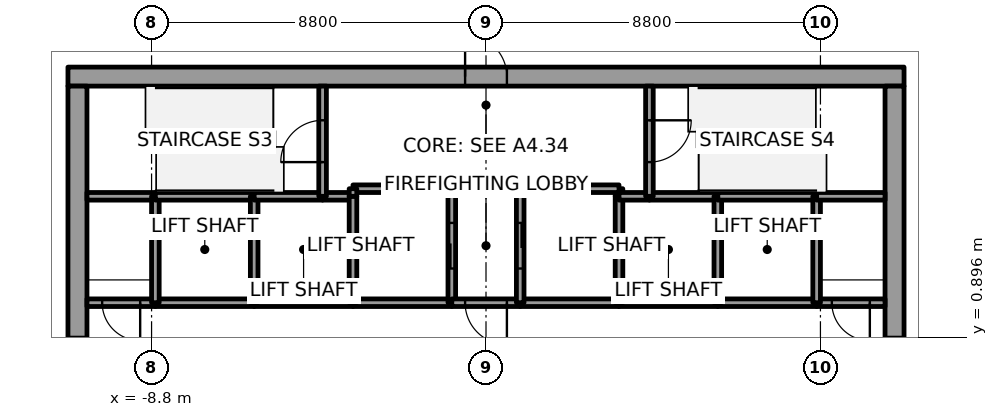
"""IFC4 building model, lengths in metres.
Left out: names, types, materials, properties, quantities, classifications, styles, units other than length and angle.
Written with IfcOpenShell. Run it as: python <this file> out.ifc"""

import sys

from ifc_helpers import new_model, si_unit, direction, frame, frame_2d, origin, place, context, subcontext, project, spatial, rectangle, extrude, element, fill, save


model = new_model("IFC4")
c1 = context("Model", 3, precision=1e-05, world=origin(), true_north=direction((0.0, 1.0)))
c2 = subcontext(c1, "Body", "Model", "MODEL_VIEW")
j1 = project(units=[si_unit("LENGTHUNIT", "METRE"), si_unit("PLANEANGLEUNIT", "RADIAN")], contexts=[c1])
p1 = place(None, origin())
s1 = spatial("IfcSite", under=j1, at=p1, CompositionType="ELEMENT")
p2 = place(p1, origin())
s2 = spatial("IfcBuilding", under=s1, at=p2, CompositionType="ELEMENT")
p3 = place(p2, frame((0.0, 0.0, 149.8)))
s3 = spatial("IfcBuildingStorey", under=s2, at=p3, CompositionType="ELEMENT", Elevation=149.8)
p4 = place(p3, frame((-11.0, 7.75, 0.0), z_axis=(0.0, 0.0, 1.0), x_axis=(1.0, 0.0, 0.0)))
e1 = element("IfcWall", 1, at=p4, inside=s3, PredefinedType="SHEAR", context=c2, shape_type="SweptSolid", body=[
    extrude(rectangle(XDim=22.0, YDim=0.5, at=frame_2d((11.0, 0.0))), origin(), (0.0, 0.0, 1.0), 4.0),
])
p5 = place(p4, frame((10.45, 0.0, 0.0)))
e2 = element("IfcOpeningElement", 2, at=p5, cuts=e1, PredefinedType="OPENING", context=c2, shape_type="SweptSolid", body=[
    extrude(rectangle(XDim=1.1, YDim=2.1, at=frame_2d((0.55, 1.05))), frame((0.0, 0.25, 0.0), z_axis=(0.0, -1.0, 0.0), x_axis=(1.0, 0.0, 0.0)), (0.0, 0.0, 1.0), 0.5),
])
p6 = place(p3, frame((-10.75, -7.5, 0.0), z_axis=(0.0, 0.0, 1.0), x_axis=(0.0, 1.0, 0.0)))
e3 = element("IfcWall", 3, at=p6, inside=s3, PredefinedType="SHEAR", context=c2, shape_type="SweptSolid", body=[
    extrude(rectangle(XDim=15.0, YDim=0.5, at=frame_2d((7.5, 0.0))), origin(), (0.0, 0.0, 1.0), 4.0),
])
p7 = place(p6, frame((6.6, 0.0, 0.0)))
e4 = element("IfcOpeningElement", 4, at=p7, cuts=e3, PredefinedType="OPENING", context=c2, shape_type="SweptSolid", body=[
    extrude(rectangle(XDim=1.8, YDim=2.1, at=frame_2d((0.9, 1.05))), frame((0.0, 0.25, 0.0), z_axis=(0.0, -1.0, 0.0), x_axis=(1.0, 0.0, 0.0)), (0.0, 0.0, 1.0), 0.5),
])
p8 = place(p3, frame((10.75, -7.5, 0.0), z_axis=(0.0, 0.0, 1.0), x_axis=(0.0, 1.0, 0.0)))
e5 = element("IfcWall", 5, at=p8, inside=s3, PredefinedType="SHEAR", context=c2, shape_type="SweptSolid", body=[
    extrude(rectangle(XDim=15.0, YDim=0.5, at=frame_2d((7.5, 0.0))), origin(), (0.0, 0.0, 1.0), 4.0),
])
p9 = place(p8, frame((6.6, 0.0, 0.0)))
e6 = element("IfcOpeningElement", 6, at=p9, cuts=e5, PredefinedType="OPENING", context=c2, shape_type="SweptSolid", body=[
    extrude(rectangle(XDim=1.8, YDim=2.1, at=frame_2d((0.9, 1.05))), frame((0.0, 0.25, 0.0), z_axis=(0.0, -1.0, 0.0), x_axis=(1.0, 0.0, 0.0)), (0.0, 0.0, 1.0), 0.5),
])
p10 = place(p3, frame((-8.7, 1.8, 0.0), z_axis=(0.0, 0.0, 1.0), x_axis=(-1.0, 0.0, 0.0)))
e7 = element("IfcWall", 7, at=p10, inside=s3, PredefinedType="SOLIDWALL", context=c2, shape_type="SweptSolid", body=[
    extrude(rectangle(XDim=1.8, YDim=0.2, at=frame_2d((0.9, 0.0))), origin(), (0.0, 0.0, 1.0), 3.85),
])
p11 = place(p10, frame((0.4, 0.0, 0.0)))
e8 = element("IfcOpeningElement", 8, at=p11, cuts=e7, PredefinedType="OPENING", context=c2, shape_type="SweptSolid", body=[
    extrude(rectangle(XDim=1.0, YDim=2.1, at=frame_2d((0.5, 1.05))), frame((0.0, 0.1, 0.0), z_axis=(0.0, -1.0, 0.0), x_axis=(1.0, 0.0, 0.0)), (0.0, 0.0, 1.0), 0.2),
])
p12 = place(p3, frame((-8.7, 4.6, 0.0), z_axis=(0.0, 0.0, 1.0), x_axis=(-1.0, 0.0, 0.0)))
e9 = element("IfcWall", 9, at=p12, inside=s3, PredefinedType="SOLIDWALL", context=c2, shape_type="SweptSolid", body=[
    extrude(rectangle(XDim=1.8, YDim=0.2, at=frame_2d((0.9, 0.0))), origin(), (0.0, 0.0, 1.0), 3.85),
])
p13 = place(p3, frame((-6.1, 1.8, 0.0), z_axis=(0.0, 0.0, 1.0), x_axis=(-1.0, 0.0, 0.0)))
e10 = element("IfcWall", 10, at=p13, inside=s3, PredefinedType="SOLIDWALL", context=c2, shape_type="SweptSolid", body=[
    extrude(rectangle(XDim=2.6, YDim=0.2, at=frame_2d((1.3, 0.0))), origin(), (0.0, 0.0, 1.0), 3.85),
])
p14 = place(p3, frame((-8.7, 1.8, 0.0), z_axis=(0.0, 0.0, 1.0), x_axis=(0.0, 1.0, 0.0)))
e11 = element("IfcWall", 11, at=p14, inside=s3, PredefinedType="SOLIDWALL", context=c2, shape_type="SweptSolid", body=[
    extrude(rectangle(XDim=2.8, YDim=0.2, at=frame_2d((1.4, 0.0))), origin(), (0.0, 0.0, 1.0), 3.85),
])
p15 = place(p3, frame((-6.1, 4.6, 0.0), z_axis=(0.0, 0.0, 1.0), x_axis=(-1.0, 0.0, 0.0)))
e12 = element("IfcWall", 12, at=p15, inside=s3, PredefinedType="SOLIDWALL", context=c2, shape_type="SweptSolid", body=[
    extrude(rectangle(XDim=2.6, YDim=0.2, at=frame_2d((1.3, 0.0))), origin(), (0.0, 0.0, 1.0), 3.85),
])
p16 = place(p3, frame((-3.5, 1.8, 0.0), z_axis=(0.0, 0.0, 1.0), x_axis=(-1.0, 0.0, 0.0)))
e13 = element("IfcWall", 13, at=p16, inside=s3, PredefinedType="SOLIDWALL", context=c2, shape_type="SweptSolid", body=[
    extrude(rectangle(XDim=2.6, YDim=0.2, at=frame_2d((1.3, 0.0))), origin(), (0.0, 0.0, 1.0), 3.85),
])
p17 = place(p3, frame((-6.1, 1.8, 0.0), z_axis=(0.0, 0.0, 1.0), x_axis=(0.0, 1.0, 0.0)))
e14 = element("IfcWall", 14, at=p17, inside=s3, PredefinedType="SOLIDWALL", context=c2, shape_type="SweptSolid", body=[
    extrude(rectangle(XDim=2.8, YDim=0.2, at=frame_2d((1.4, 0.0))), origin(), (0.0, 0.0, 1.0), 3.85),
])
p18 = place(p3, frame((-4.3, 4.6, 0.0), z_axis=(0.0, 0.0, 1.0), x_axis=(-1.0, 0.0, 0.0)))
e15 = element("IfcWall", 15, at=p18, inside=s3, PredefinedType="SOLIDWALL", context=c2, shape_type="SweptSolid", body=[
    extrude(rectangle(XDim=1.8, YDim=0.2, at=frame_2d((0.9, 0.0))), origin(), (0.0, 0.0, 1.0), 3.85),
])
p19 = place(p3, frame((-3.5, 4.6, 0.0), z_axis=(0.0, 0.0, 1.0), x_axis=(-1.0, 0.0, 0.0)))
e16 = element("IfcWall", 16, at=p19, inside=s3, PredefinedType="SOLIDWALL", context=c2, shape_type="SweptSolid", body=[
    extrude(rectangle(XDim=0.8, YDim=0.2, at=frame_2d((0.4, 0.0))), origin(), (0.0, 0.0, 1.0), 3.85),
])
p20 = place(p3, frame((-4.3, 4.6, 0.0), z_axis=(0.0, 0.0, 1.0), x_axis=(0.0, 1.0, 0.0)))
e17 = element("IfcWall", 17, at=p20, inside=s3, PredefinedType="SOLIDWALL", context=c2, shape_type="SweptSolid", body=[
    extrude(rectangle(XDim=2.9, YDim=0.2, at=frame_2d((1.45, 0.0))), origin(), (0.0, 0.0, 1.0), 3.85),
])
p21 = place(p20, frame((0.9, 0.0, 0.0)))
e18 = element("IfcOpeningElement", 18, at=p21, cuts=e17, PredefinedType="OPENING", context=c2, shape_type="SweptSolid", body=[
    extrude(rectangle(XDim=1.1, YDim=2.1, at=frame_2d((0.55, 1.05))), frame((0.0, 0.1, 0.0), z_axis=(0.0, -1.0, 0.0), x_axis=(1.0, 0.0, 0.0)), (0.0, 0.0, 1.0), 0.2),
])
p22 = place(p3, frame((-0.9, 1.8, 0.0), z_axis=(0.0, 0.0, 1.0), x_axis=(-1.0, 0.0, 0.0)))
e19 = element("IfcWall", 19, at=p22, inside=s3, PredefinedType="SOLIDWALL", context=c2, shape_type="SweptSolid", body=[
    extrude(rectangle(XDim=2.6, YDim=0.2, at=frame_2d((1.3, 0.0))), origin(), (0.0, 0.0, 1.0), 3.85),
])
p23 = place(p3, frame((-3.5, 4.6, 0.0), z_axis=(0.0, 0.0, 1.0), x_axis=(0.0, -1.0, 0.0)))
e20 = element("IfcWall", 20, at=p23, inside=s3, PredefinedType="SOLIDWALL", context=c2, shape_type="SweptSolid", body=[
    extrude(rectangle(XDim=2.8, YDim=0.2, at=frame_2d((1.4, 0.0))), origin(), (0.0, 0.0, 1.0), 3.85),
])
p24 = place(p3, frame((-0.9, 1.8, 0.0), z_axis=(0.0, 0.0, 1.0), x_axis=(0.0, 1.0, 0.0)))
e21 = element("IfcWall", 21, at=p24, inside=s3, PredefinedType="SOLIDWALL", context=c2, shape_type="SweptSolid", body=[
    extrude(rectangle(XDim=3.0, YDim=0.2, at=frame_2d((1.5, 0.0))), origin(), (0.0, 0.0, 1.0), 3.85),
])
p25 = place(p24, frame((0.9, 0.0, 0.0)))
e22 = element("IfcOpeningElement", 22, at=p25, cuts=e21, PredefinedType="OPENING", context=c2, shape_type="SweptSolid", body=[
    extrude(rectangle(XDim=1.2, YDim=2.1, at=frame_2d((0.6, 1.05))), frame((0.0, 0.1, 0.0), z_axis=(0.0, -1.0, 0.0), x_axis=(1.0, 0.0, 0.0)), (0.0, 0.0, 1.0), 0.2),
])
p26 = place(p3, frame((-0.9, 4.8, 0.0), z_axis=(0.0, 0.0, 1.0), x_axis=(-1.0, 0.0, 0.0)))
e23 = element("IfcWall", 23, at=p26, inside=s3, PredefinedType="SOLIDWALL", context=c2, shape_type="SweptSolid", body=[
    extrude(rectangle(XDim=2.6, YDim=0.2, at=frame_2d((1.3, 0.0))), origin(), (0.0, 0.0, 1.0), 3.85),
])
p27 = place(p3, frame((-3.5, 4.8, 0.0), z_axis=(0.0, 0.0, 1.0), x_axis=(0.0, -1.0, 0.0)))
e24 = element("IfcWall", 24, at=p27, inside=s3, PredefinedType="SOLIDWALL", context=c2, shape_type="SweptSolid", body=[
    extrude(rectangle(XDim=0.2, YDim=0.2, at=frame_2d((0.1, 0.0))), origin(), (0.0, 0.0, 1.0), 3.85),
])
p28 = place(p3, frame((0.9, 1.8, 0.0), z_axis=(0.0, 0.0, 1.0), x_axis=(-1.0, 0.0, 0.0)))
e25 = element("IfcWall", 25, at=p28, inside=s3, PredefinedType="SOLIDWALL", context=c2, shape_type="SweptSolid", body=[
    extrude(rectangle(XDim=1.8, YDim=0.2, at=frame_2d((0.9, 0.0))), origin(), (0.0, 0.0, 1.0), 3.85),
])
p29 = place(p28, frame((0.35, 0.0, 0.0)))
e26 = element("IfcOpeningElement", 26, at=p29, cuts=e25, PredefinedType="OPENING", context=c2, shape_type="SweptSolid", body=[
    extrude(rectangle(XDim=1.1, YDim=2.1, at=frame_2d((0.55, 1.05))), frame((0.0, 0.1, 0.0), z_axis=(0.0, -1.0, 0.0), x_axis=(1.0, 0.0, 0.0)), (0.0, 0.0, 1.0), 0.2),
])
p30 = place(p3, frame((3.5, 1.8, 0.0), z_axis=(0.0, 0.0, 1.0), x_axis=(-1.0, 0.0, 0.0)))
e27 = element("IfcWall", 27, at=p30, inside=s3, PredefinedType="SOLIDWALL", context=c2, shape_type="SweptSolid", body=[
    extrude(rectangle(XDim=2.6, YDim=0.2, at=frame_2d((1.3, 0.0))), origin(), (0.0, 0.0, 1.0), 3.85),
])
p31 = place(p3, frame((3.5, 4.6, 0.0), z_axis=(0.0, 0.0, 1.0), x_axis=(0.0, 1.0, 0.0)))
e28 = element("IfcWall", 28, at=p31, inside=s3, PredefinedType="SOLIDWALL", context=c2, shape_type="SweptSolid", body=[
    extrude(rectangle(XDim=0.2, YDim=0.2, at=frame_2d((0.1, 0.0))), origin(), (0.0, 0.0, 1.0), 3.85),
])
p32 = place(p3, frame((3.5, 4.8, 0.0), z_axis=(0.0, 0.0, 1.0), x_axis=(-1.0, 0.0, 0.0)))
e29 = element("IfcWall", 29, at=p32, inside=s3, PredefinedType="SOLIDWALL", context=c2, shape_type="SweptSolid", body=[
    extrude(rectangle(XDim=2.6, YDim=0.2, at=frame_2d((1.3, 0.0))), origin(), (0.0, 0.0, 1.0), 3.85),
])
p33 = place(p3, frame((0.9, 4.8, 0.0), z_axis=(0.0, 0.0, 1.0), x_axis=(0.0, -1.0, 0.0)))
e30 = element("IfcWall", 30, at=p33, inside=s3, PredefinedType="SOLIDWALL", context=c2, shape_type="SweptSolid", body=[
    extrude(rectangle(XDim=3.0, YDim=0.2, at=frame_2d((1.5, 0.0))), origin(), (0.0, 0.0, 1.0), 3.85),
])
p34 = place(p33, frame((0.9, 0.0, 0.0)))
e31 = element("IfcOpeningElement", 31, at=p34, cuts=e30, PredefinedType="OPENING", context=c2, shape_type="SweptSolid", body=[
    extrude(rectangle(XDim=1.2, YDim=2.1, at=frame_2d((0.6, 1.05))), frame((0.0, 0.1, 0.0), z_axis=(0.0, -1.0, 0.0), x_axis=(1.0, 0.0, 0.0)), (0.0, 0.0, 1.0), 0.2),
])
p35 = place(p3, frame((6.1, 1.8, 0.0), z_axis=(0.0, 0.0, 1.0), x_axis=(-1.0, 0.0, 0.0)))
e32 = element("IfcWall", 32, at=p35, inside=s3, PredefinedType="SOLIDWALL", context=c2, shape_type="SweptSolid", body=[
    extrude(rectangle(XDim=2.6, YDim=0.2, at=frame_2d((1.3, 0.0))), origin(), (0.0, 0.0, 1.0), 3.85),
])
p36 = place(p3, frame((3.5, 1.8, 0.0), z_axis=(0.0, 0.0, 1.0), x_axis=(0.0, 1.0, 0.0)))
e33 = element("IfcWall", 33, at=p36, inside=s3, PredefinedType="SOLIDWALL", context=c2, shape_type="SweptSolid", body=[
    extrude(rectangle(XDim=2.8, YDim=0.2, at=frame_2d((1.4, 0.0))), origin(), (0.0, 0.0, 1.0), 3.85),
])
p37 = place(p3, frame((4.3, 4.6, 0.0), z_axis=(0.0, 0.0, 1.0), x_axis=(-1.0, 0.0, 0.0)))
e34 = element("IfcWall", 34, at=p37, inside=s3, PredefinedType="SOLIDWALL", context=c2, shape_type="SweptSolid", body=[
    extrude(rectangle(XDim=0.8, YDim=0.2, at=frame_2d((0.4, 0.0))), origin(), (0.0, 0.0, 1.0), 3.85),
])
p38 = place(p3, frame((6.1, 4.6, 0.0), z_axis=(0.0, 0.0, 1.0), x_axis=(-1.0, 0.0, 0.0)))
e35 = element("IfcWall", 35, at=p38, inside=s3, PredefinedType="SOLIDWALL", context=c2, shape_type="SweptSolid", body=[
    extrude(rectangle(XDim=1.8, YDim=0.2, at=frame_2d((0.9, 0.0))), origin(), (0.0, 0.0, 1.0), 3.85),
])
p39 = place(p3, frame((4.3, 7.5, 0.0), z_axis=(0.0, 0.0, 1.0), x_axis=(0.0, -1.0, 0.0)))
e36 = element("IfcWall", 36, at=p39, inside=s3, PredefinedType="SOLIDWALL", context=c2, shape_type="SweptSolid", body=[
    extrude(rectangle(XDim=2.9, YDim=0.2, at=frame_2d((1.45, 0.0))), origin(), (0.0, 0.0, 1.0), 3.85),
])
p40 = place(p39, frame((0.9, 0.0, 0.0)))
e37 = element("IfcOpeningElement", 37, at=p40, cuts=e36, PredefinedType="OPENING", context=c2, shape_type="SweptSolid", body=[
    extrude(rectangle(XDim=1.1, YDim=2.1, at=frame_2d((0.55, 1.05))), frame((0.0, 0.1, 0.0), z_axis=(0.0, -1.0, 0.0), x_axis=(1.0, 0.0, 0.0)), (0.0, 0.0, 1.0), 0.2),
])
p41 = place(p3, frame((8.7, 1.8, 0.0), z_axis=(0.0, 0.0, 1.0), x_axis=(-1.0, 0.0, 0.0)))
e38 = element("IfcWall", 38, at=p41, inside=s3, PredefinedType="SOLIDWALL", context=c2, shape_type="SweptSolid", body=[
    extrude(rectangle(XDim=2.6, YDim=0.2, at=frame_2d((1.3, 0.0))), origin(), (0.0, 0.0, 1.0), 3.85),
])
p42 = place(p3, frame((6.1, 1.8, 0.0), z_axis=(0.0, 0.0, 1.0), x_axis=(0.0, 1.0, 0.0)))
e39 = element("IfcWall", 39, at=p42, inside=s3, PredefinedType="SOLIDWALL", context=c2, shape_type="SweptSolid", body=[
    extrude(rectangle(XDim=2.8, YDim=0.2, at=frame_2d((1.4, 0.0))), origin(), (0.0, 0.0, 1.0), 3.85),
])
p43 = place(p3, frame((8.7, 4.6, 0.0), z_axis=(0.0, 0.0, 1.0), x_axis=(-1.0, 0.0, 0.0)))
e40 = element("IfcWall", 40, at=p43, inside=s3, PredefinedType="SOLIDWALL", context=c2, shape_type="SweptSolid", body=[
    extrude(rectangle(XDim=2.6, YDim=0.2, at=frame_2d((1.3, 0.0))), origin(), (0.0, 0.0, 1.0), 3.85),
])
p44 = place(p3, frame((10.5, 1.8, 0.0), z_axis=(0.0, 0.0, 1.0), x_axis=(-1.0, 0.0, 0.0)))
e41 = element("IfcWall", 41, at=p44, inside=s3, PredefinedType="SOLIDWALL", context=c2, shape_type="SweptSolid", body=[
    extrude(rectangle(XDim=1.8, YDim=0.2, at=frame_2d((0.9, 0.0))), origin(), (0.0, 0.0, 1.0), 3.85),
])
p45 = place(p44, frame((0.4, 0.0, 0.0)))
e42 = element("IfcOpeningElement", 42, at=p45, cuts=e41, PredefinedType="OPENING", context=c2, shape_type="SweptSolid", body=[
    extrude(rectangle(XDim=1.0, YDim=2.1, at=frame_2d((0.5, 1.05))), frame((0.0, 0.1, 0.0), z_axis=(0.0, -1.0, 0.0), x_axis=(1.0, 0.0, 0.0)), (0.0, 0.0, 1.0), 0.2),
])
p46 = place(p3, frame((8.7, 4.6, 0.0), z_axis=(0.0, 0.0, 1.0), x_axis=(0.0, -1.0, 0.0)))
e43 = element("IfcWall", 43, at=p46, inside=s3, PredefinedType="SOLIDWALL", context=c2, shape_type="SweptSolid", body=[
    extrude(rectangle(XDim=2.8, YDim=0.2, at=frame_2d((1.4, 0.0))), origin(), (0.0, 0.0, 1.0), 3.85),
])
p47 = place(p3, frame((10.5, 4.6, 0.0), z_axis=(0.0, 0.0, 1.0), x_axis=(-1.0, 0.0, 0.0)))
e44 = element("IfcWall", 44, at=p47, inside=s3, PredefinedType="SOLIDWALL", context=c2, shape_type="SweptSolid", body=[
    extrude(rectangle(XDim=1.8, YDim=0.2, at=frame_2d((0.9, 0.0))), origin(), (0.0, 0.0, 1.0), 3.85),
])
p48 = place(p25, origin())
e45 = element("IfcDoor", 45, at=p48, inside=s3, OperationType="SLIDING_TO_RIGHT", PredefinedType="DOOR", context=c2, shape_type="SweptSolid", body=[
    extrude(rectangle(XDim=1.2, YDim=2.1, at=frame_2d((0.6, 1.05))), frame((0.0, 0.025, 0.0), z_axis=(0.0, -1.0, 0.0), x_axis=(1.0, 0.0, 0.0)), (0.0, 0.0, 1.0), 0.05),
])
fill(e22, e45)
p49 = place(p34, origin())
e46 = element("IfcDoor", 46, at=p49, inside=s3, OperationType="SLIDING_TO_RIGHT", PredefinedType="DOOR", context=c2, shape_type="SweptSolid", body=[
    extrude(rectangle(XDim=1.2, YDim=2.1, at=frame_2d((0.6, 1.05))), frame((0.0, 0.025, 0.0), z_axis=(0.0, -1.0, 0.0), x_axis=(1.0, 0.0, 0.0)), (0.0, 0.0, 1.0), 0.05),
])
fill(e31, e46)
p50 = place(p29, origin())
e47 = element("IfcDoor", 47, at=p50, inside=s3, OperationType="SINGLE_SWING_LEFT", PredefinedType="DOOR", context=c2, shape_type="SweptSolid", body=[
    extrude(rectangle(XDim=1.1, YDim=2.1, at=frame_2d((0.55, 1.05))), frame((0.0, 0.025, 0.0), z_axis=(0.0, -1.0, 0.0), x_axis=(1.0, 0.0, 0.0)), (0.0, 0.0, 1.0), 0.05),
])
fill(e26, e47)
p51 = place(p11, origin())
e48 = element("IfcDoor", 48, at=p51, inside=s3, OperationType="SINGLE_SWING_RIGHT", PredefinedType="DOOR", context=c2, shape_type="SweptSolid", body=[
    extrude(rectangle(XDim=1.0, YDim=2.1, at=frame_2d((0.5, 1.05))), frame((0.0, 0.025, 0.0), z_axis=(0.0, -1.0, 0.0), x_axis=(1.0, 0.0, 0.0)), (0.0, 0.0, 1.0), 0.05),
])
fill(e8, e48)
p52 = place(p45, origin())
e49 = element("IfcDoor", 49, at=p52, inside=s3, OperationType="SINGLE_SWING_LEFT", PredefinedType="DOOR", context=c2, shape_type="SweptSolid", body=[
    extrude(rectangle(XDim=1.0, YDim=2.1, at=frame_2d((0.5, 1.05))), frame((0.0, 0.025, 0.0), z_axis=(0.0, -1.0, 0.0), x_axis=(1.0, 0.0, 0.0)), (0.0, 0.0, 1.0), 0.05),
])
fill(e42, e49)
p53 = place(p21, origin())
e50 = element("IfcDoor", 50, at=p53, inside=s3, OperationType="SINGLE_SWING_LEFT", PredefinedType="DOOR", context=c2, shape_type="SweptSolid", body=[
    extrude(rectangle(XDim=1.1, YDim=2.1, at=frame_2d((0.55, 1.05))), frame((0.0, 0.025, 0.0), z_axis=(0.0, -1.0, 0.0), x_axis=(1.0, 0.0, 0.0)), (0.0, 0.0, 1.0), 0.05),
])
fill(e18, e50)
p54 = place(p40, origin())
e51 = element("IfcDoor", 51, at=p54, inside=s3, OperationType="SINGLE_SWING_RIGHT", PredefinedType="DOOR", context=c2, shape_type="SweptSolid", body=[
    extrude(rectangle(XDim=1.1, YDim=2.1, at=frame_2d((0.55, 1.05))), frame((0.0, 0.025, 0.0), z_axis=(0.0, -1.0, 0.0), x_axis=(1.0, 0.0, 0.0)), (0.0, 0.0, 1.0), 0.05),
])
fill(e37, e51)
p55 = place(p7, origin())
e52 = element("IfcDoor", 52, at=p55, inside=s3, OperationType="DOUBLE_DOOR_SINGLE_SWING", PredefinedType="DOOR", context=c2, shape_type="SweptSolid", body=[
    extrude(rectangle(XDim=1.8, YDim=2.1, at=frame_2d((0.9, 1.05))), frame((0.0, 0.025, 0.0), z_axis=(0.0, -1.0, 0.0), x_axis=(1.0, 0.0, 0.0)), (0.0, 0.0, 1.0), 0.05),
])
fill(e4, e52)
p56 = place(p9, origin())
e53 = element("IfcDoor", 53, at=p56, inside=s3, OperationType="DOUBLE_DOOR_SINGLE_SWING", PredefinedType="DOOR", context=c2, shape_type="SweptSolid", body=[
    extrude(rectangle(XDim=1.8, YDim=2.1, at=frame_2d((0.9, 1.05))), frame((0.0, 0.025, 0.0), z_axis=(0.0, -1.0, 0.0), x_axis=(1.0, 0.0, 0.0)), (0.0, 0.0, 1.0), 0.05),
])
fill(e6, e53)
p57 = place(p5, origin())
e54 = element("IfcDoor", 54, at=p57, inside=s3, OperationType="SINGLE_SWING_LEFT", PredefinedType="DOOR", context=c2, shape_type="SweptSolid", body=[
    extrude(rectangle(XDim=1.1, YDim=2.1, at=frame_2d((0.55, 1.05))), frame((0.0, 0.025, 0.0), z_axis=(0.0, -1.0, 0.0), x_axis=(1.0, 0.0, 0.0)), (0.0, 0.0, 1.0), 0.05),
])
fill(e2, e54)
save(model, sys.argv[1])
